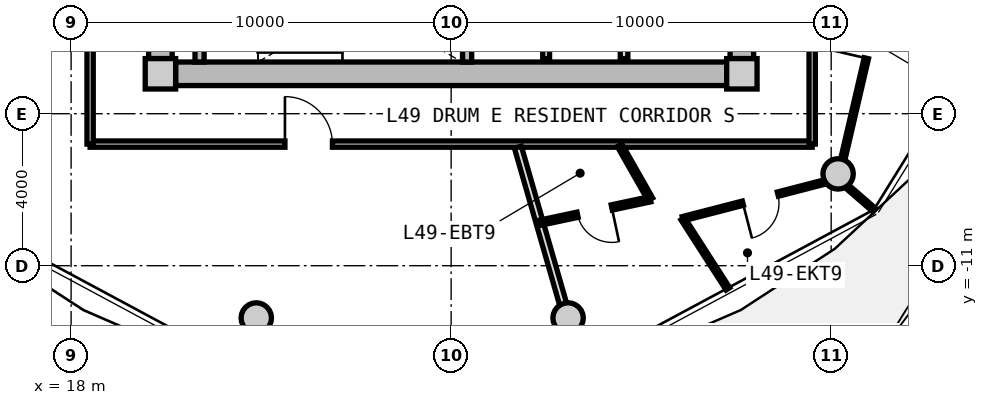
"""IFC4 building model, lengths in metres.
Left out: names, types, materials, properties, quantities, classifications, styles, units other than length and angle.
Written with IfcOpenShell. Run it as: python <this file> out.ifc"""

import sys

from ifc_helpers import new_model, si_unit, direction, frame, frame_2d, origin, origin_2d, place, context, subcontext, project, spatial, rectangle, circle, extrude, source, transform, mapped, element, fill, save


model = new_model("IFC4")
c1 = context("Model", 3, precision=1e-05, world=origin(), true_north=direction((0.0, 1.0)))
c2 = subcontext(c1, "Body", "Model", "MODEL_VIEW")
j1 = project(units=[si_unit("LENGTHUNIT", "METRE"), si_unit("PLANEANGLEUNIT", "RADIAN")], contexts=[c1])
p1 = place(None, origin())
s1 = spatial("IfcSite", under=j1, at=p1, CompositionType="ELEMENT")
p2 = place(p1, origin())
s2 = spatial("IfcBuilding", under=s1, at=p2, CompositionType="ELEMENT")
p3 = place(p2, frame((0.0, 0.0, 158.7)))
s3 = spatial("IfcBuildingStorey", under=s2, at=p3, CompositionType="ELEMENT", Elevation=158.7)
m1 = source(origin(), c2, "Body", "SweptSolid", [
    extrude(rectangle(XDim=0.8, YDim=0.8, at=origin_2d()), origin(), (0.0, 0.0, 1.0), 3.05),
])
for number, where, z_axis, x_axis in (
    (1, (20.35, -5.95, 0.0), (0.0, 0.0, 1.0), (1.0, 0.0, 0.0)),
    (2, (35.65, -5.95, 0.0), (0.0, 0.0, 1.0), (1.0, 0.0, 0.0)),
):
    element("IfcColumn", number, at=place(p3, frame(where, z_axis=z_axis, x_axis=x_axis)), inside=s3, PredefinedType="COLUMN", context=c2, shape_type="MappedRepresentation", body=[
        mapped(m1, transform((0.0, 0.0, 0.0), x_axis=(1.0, 0.0, 0.0), y_axis=(0.0, 1.0, 0.0), z_axis=(0.0, 0.0, 1.0), scale=1.0)),
    ])
m2 = source(origin(), c2, "Body", "SweptSolid", [
    extrude(rectangle(XDim=14.5, YDim=0.62, at=frame_2d((7.25, 0.0))), origin(), (0.0, 0.0, 1.0), 2.81),
])
p4 = place(p3, frame((35.25, -5.95, 0.0), z_axis=(0.0, 0.0, 1.0), x_axis=(-1.0, 0.0, 0.0)))
e3 = element("IfcWall", 3, at=p4, inside=s3, PredefinedType="SHEAR", context=c2, shape_type="MappedRepresentation", body=[
    mapped(m2, transform((0.0, 0.0, 0.0), x_axis=(1.0, 0.0, 0.0), y_axis=(0.0, 1.0, 0.0), z_axis=(0.0, 0.0, 1.0), scale=1.0)),
])
m3 = source(origin(), c2, "Body", "SweptSolid", [
    extrude(rectangle(XDim=11.1, YDim=0.62, at=frame_2d((5.55, 0.0))), origin(), (0.0, 0.0, 1.0), 2.81),
])
p5 = place(p3, frame((20.35, -5.55, 0.0), z_axis=(0.0, 0.0, 1.0), x_axis=(0.0, 1.0, 0.0)))
e4 = element("IfcWall", 4, at=p5, inside=s3, PredefinedType="SHEAR", context=c2, shape_type="MappedRepresentation", body=[
    mapped(m3, transform((0.0, 0.0, 0.0), x_axis=(1.0, 0.0, 0.0), y_axis=(0.0, 1.0, 0.0), z_axis=(0.0, 0.0, 1.0), scale=1.0)),
])
p6 = place(p5, frame((3.8, 0.0, 0.0)))
e5 = element("IfcOpeningElement", 5, at=p6, cuts=e4, PredefinedType="OPENING", context=c2, shape_type="SweptSolid", body=[
    extrude(rectangle(XDim=1.2, YDim=2.15, at=frame_2d((0.6, 1.075))), frame((0.0, 0.32, 0.0), z_axis=(0.0, -1.0, 0.0), x_axis=(1.0, 0.0, 0.0)), (0.0, 0.0, 1.0), 0.64),
])
p7 = place(p3, frame((35.65, 5.55, 0.0), z_axis=(0.0, 0.0, 1.0), x_axis=(0.0, -1.0, 0.0)))
e6 = element("IfcWall", 6, at=p7, inside=s3, PredefinedType="SHEAR", context=c2, shape_type="MappedRepresentation", body=[
    mapped(m3, transform((0.0, 0.0, 0.0), x_axis=(1.0, 0.0, 0.0), y_axis=(0.0, 1.0, 0.0), z_axis=(0.0, 0.0, 1.0), scale=1.0)),
])
p8 = place(p7, frame((5.65, 0.0, 0.0)))
e7 = element("IfcOpeningElement", 7, at=p8, cuts=e6, PredefinedType="OPENING", context=c2, shape_type="SweptSolid", body=[
    extrude(rectangle(XDim=1.2, YDim=2.15, at=frame_2d((0.6, 1.075))), frame((0.0, 0.32, 0.0), z_axis=(0.0, -1.0, 0.0), x_axis=(1.0, 0.0, 0.0)), (0.0, 0.0, 1.0), 0.64),
])
m4 = source(origin(), c2, "Body", "SweptSolid", [
    extrude(circle(Radius=0.4, at=origin_2d()), origin(), (0.0, 0.0, 1.0), 3.05),
])
for number, where, z_axis, x_axis in (
    (8, (22.873, -12.375, 0.0), (0.0, 0.0, 1.0), (1.0, 0.0, 0.0)),
    (9, (31.077, -12.375, 0.0), (0.0, 0.0, 1.0), (1.0, 0.0, 0.0)),
    (10, (38.183, -8.584, 0.0), (0.0, 0.0, 1.0), (1.0, 0.0, 0.0)),
):
    element("IfcColumn", number, at=place(p3, frame(where, z_axis=z_axis, x_axis=x_axis)), inside=s3, PredefinedType="COLUMN", context=c2, shape_type="MappedRepresentation", body=[
        mapped(m4, transform((0.0, 0.0, 0.0), x_axis=(1.0, 0.0, 0.0), y_axis=(0.0, 1.0, 0.0), z_axis=(0.0, 0.0, 1.0), scale=1.0)),
    ])
m5 = source(origin(), c2, "Body", "SweptSolid", [
    extrude(rectangle(XDim=3.19, YDim=0.24, at=frame_2d((1.595, 0.0))), origin(), (0.0, 0.0, 1.0), 2.81),
])
for number, where, z_axis, x_axis in (
    (11, (21.38, -5.64, 0.0), (0.0, 0.0, 1.0), (0.0, 1.0, 0.0)),
    (12, (28.42, -5.64, 0.0), (0.0, 0.0, 1.0), (0.0, 1.0, 0.0)),
):
    element("IfcWall", number, at=place(p3, frame(where, z_axis=z_axis, x_axis=x_axis)), inside=s3, PredefinedType="PARTITIONING", context=c2, shape_type="MappedRepresentation", body=[
        mapped(m5, transform((0.0, 0.0, 0.0), x_axis=(1.0, 0.0, 0.0), y_axis=(0.0, 1.0, 0.0), z_axis=(0.0, 0.0, 1.0), scale=1.0)),
    ])
m6 = source(origin(), c2, "Body", "SweptSolid", [
    extrude(rectangle(XDim=3.8, YDim=0.2, at=frame_2d((1.9, 0.0))), origin(), (0.0, 0.0, 1.0), 2.795),
])
p9 = place(p3, frame((32.55, -5.55, 0.0), z_axis=(0.0, 0.0, 1.0), x_axis=(0.0, 1.0, 0.0)))
e13 = element("IfcWall", 13, at=p9, inside=s3, PredefinedType="PARTITIONING", context=c2, shape_type="MappedRepresentation", body=[
    mapped(m6, transform((0.0, 0.0, 0.0), x_axis=(1.0, 0.0, 0.0), y_axis=(0.0, 1.0, 0.0), z_axis=(0.0, 0.0, 1.0), scale=1.0)),
])
m7 = source(origin(), c2, "Body", "SweptSolid", [
    extrude(rectangle(XDim=3.22, YDim=0.18, at=frame_2d((1.61, 0.0))), origin(), (0.0, 0.0, 1.0), 2.795),
])
p10 = place(p3, frame((30.5, -5.55, 0.0), z_axis=(0.0, 0.0, 1.0), x_axis=(0.0, 1.0, 0.0)))
e14 = element("IfcWall", 14, at=p10, inside=s3, PredefinedType="PARTITIONING", context=c2, shape_type="MappedRepresentation", body=[
    mapped(m7, transform((0.0, 0.0, 0.0), x_axis=(1.0, 0.0, 0.0), y_axis=(0.0, 1.0, 0.0), z_axis=(0.0, 0.0, 1.0), scale=1.0)),
])
m8 = source(origin(), c2, "Body", "SweptSolid", [
    extrude(rectangle(XDim=19.0, YDim=0.165, at=frame_2d((9.5, 0.0))), origin(), (0.0, 0.0, 1.0), 2.795),
])
p11 = place(p3, frame((37.5, -7.8, 0.0), z_axis=(0.0, 0.0, 1.0), x_axis=(-1.0, 0.0, 0.0)))
e15 = element("IfcWall", 15, at=p11, inside=s3, PredefinedType="PARTITIONING", context=c2, shape_type="MappedRepresentation", body=[
    mapped(m8, transform((0.0, 0.0, 0.0), x_axis=(1.0, 0.0, 0.0), y_axis=(0.0, 1.0, 0.0), z_axis=(0.0, 0.0, 1.0), scale=1.0)),
])
p12 = place(p11, frame((12.623, 0.0, 0.0)))
e16 = element("IfcOpeningElement", 16, at=p12, cuts=e15, PredefinedType="OPENING", context=c2, shape_type="SweptSolid", body=[
    extrude(rectangle(XDim=1.25, YDim=2.2, at=frame_2d((0.625, 1.1))), frame((0.0, 0.093, 0.0), z_axis=(0.0, -1.0, 0.0), x_axis=(1.0, 0.0, 0.0)), (0.0, 0.0, 1.0), 0.185),
])
m9 = source(origin(), c2, "Body", "SweptSolid", [
    extrude(rectangle(XDim=7.365, YDim=0.165, at=frame_2d((3.682, 0.0))), origin(), (0.0, 0.0, 1.0), 2.795),
])
p13 = place(p3, frame((18.5, -7.8, 0.0), z_axis=(0.0, 0.0, 1.0), x_axis=(0.0, 1.0, 0.0)))
e17 = element("IfcWall", 17, at=p13, inside=s3, PredefinedType="PARTITIONING", context=c2, shape_type="MappedRepresentation", body=[
    mapped(m9, transform((0.0, 0.0, 0.0), x_axis=(1.0, 0.0, 0.0), y_axis=(0.0, 1.0, 0.0), z_axis=(0.0, 0.0, 1.0), scale=1.0)),
])
m10 = source(origin(), c2, "Body", "SweptSolid", [
    extrude(rectangle(XDim=6.88, YDim=0.165, at=frame_2d((3.44, 0.0))), origin(), (0.0, 0.0, 1.0), 2.795),
])
p14 = place(p3, frame((37.5, -0.92, 0.0), z_axis=(0.0, 0.0, 1.0), x_axis=(0.0, -1.0, 0.0)))
e18 = element("IfcWall", 18, at=p14, inside=s3, PredefinedType="PARTITIONING", context=c2, shape_type="MappedRepresentation", body=[
    mapped(m10, transform((0.0, 0.0, 0.0), x_axis=(1.0, 0.0, 0.0), y_axis=(0.0, 1.0, 0.0), z_axis=(0.0, 0.0, 1.0), scale=1.0)),
])
p15 = place(p14, frame((2.915, 0.0, 0.0)))
e19 = element("IfcOpeningElement", 19, at=p15, cuts=e18, PredefinedType="OPENING", context=c2, shape_type="SweptSolid", body=[
    extrude(rectangle(XDim=1.05, YDim=2.15, at=frame_2d((0.525, 1.075))), frame((0.0, 0.093, 0.0), z_axis=(0.0, -1.0, 0.0), x_axis=(1.0, 0.0, 0.0)), (0.0, 0.0, 1.0), 0.185),
])
m11 = source(origin(), c2, "Body", "SweptSolid", [
    extrude(rectangle(XDim=6.035, YDim=0.19, at=frame_2d((3.018, 0.0))), origin(), (0.0, 0.0, 1.0), 2.345),
])
p16 = place(p3, frame((29.756, -7.88, 0.0), z_axis=(0.0, 0.0, 1.0), x_axis=(0.276809454862, -0.960924828329, 0.0)))
e20 = element("IfcWall", 20, at=p16, inside=s3, PredefinedType="PARTITIONING", context=c2, shape_type="MappedRepresentation", body=[
    mapped(m11, transform((0.0, 0.0, 0.0), x_axis=(1.0, 0.0, 0.0), y_axis=(0.0, 1.0, 0.0), z_axis=(0.0, 0.0, 1.0), scale=1.0)),
])
m12 = source(origin(), c2, "Body", "SweptSolid", [
    extrude(rectangle(XDim=7.469, YDim=0.115, at=frame_2d((3.734, 0.0))), origin(), (0.0, 0.0, 1.0), 2.795),
])
p17 = place(p3, frame((38.187, -8.715, 0.0), z_axis=(0.0, 0.0, 1.0), x_axis=(0.226790420763, 0.973943584121, 0.0)))
e21 = element("IfcWall", 21, at=p17, inside=s3, PredefinedType="PARTITIONING", context=c2, shape_type="MappedRepresentation", body=[
    mapped(m12, transform((0.0, 0.0, 0.0), x_axis=(1.0, 0.0, 0.0), y_axis=(0.0, 1.0, 0.0), z_axis=(0.0, 0.0, 1.0), scale=1.0)),
])
p18 = place(p17, frame((3.259, 0.0, 0.0)))
e22 = element("IfcOpeningElement", 22, at=p18, cuts=e21, PredefinedType="OPENING", context=c2, shape_type="SweptSolid", body=[
    extrude(rectangle(XDim=0.95, YDim=2.1, at=frame_2d((0.475, 1.05))), frame((0.0, 0.067, 0.0), z_axis=(0.0, -1.0, 0.0), x_axis=(1.0, 0.0, 0.0)), (0.0, 0.0, 1.0), 0.135),
])
m13 = source(origin(), c2, "Body", "SweptSolid", [
    extrude(rectangle(XDim=1.258, YDim=0.115, at=frame_2d((0.629, 0.0))), origin(), (0.0, 0.0, 1.0), 2.795),
])
p19 = place(p3, frame((38.187, -8.715, 0.0), z_axis=(0.0, 0.0, 1.0), x_axis=(0.755765923317, -0.654841865761, 0.0)))
e23 = element("IfcWall", 23, at=p19, inside=s3, PredefinedType="PARTITIONING", context=c2, shape_type="MappedRepresentation", body=[
    mapped(m13, transform((0.0, 0.0, 0.0), x_axis=(1.0, 0.0, 0.0), y_axis=(0.0, 1.0, 0.0), z_axis=(0.0, 0.0, 1.0), scale=1.0)),
])
m14 = source(origin(), c2, "Body", "SweptSolid", [
    extrude(rectangle(XDim=1.635, YDim=0.14, at=frame_2d((0.817, 0.0))), origin(), (0.0, 0.0, 1.0), 2.795),
])
p20 = place(p3, frame((32.434, -7.83, 0.0), z_axis=(0.0, 0.0, 1.0), x_axis=(0.494078690764, -0.869417188312, 0.0)))
e24 = element("IfcWall", 24, at=p20, inside=s3, PredefinedType="PARTITIONING", context=c2, shape_type="MappedRepresentation", body=[
    mapped(m14, transform((0.0, 0.0, 0.0), x_axis=(1.0, 0.0, 0.0), y_axis=(0.0, 1.0, 0.0), z_axis=(0.0, 0.0, 1.0), scale=1.0)),
])
m15 = source(origin(), c2, "Body", "SweptSolid", [
    extrude(rectangle(XDim=2.995, YDim=0.14, at=frame_2d((1.498, 0.0))), origin(), (0.0, 0.0, 1.0), 2.435),
])
p21 = place(p3, frame((33.241, -9.251, 0.0), z_axis=(0.0, 0.0, 1.0), x_axis=(-0.978075914325, -0.208248663425, 0.0)))
e25 = element("IfcWall", 25, at=p21, inside=s3, PredefinedType="PARTITIONING", context=c2, shape_type="MappedRepresentation", body=[
    mapped(m15, transform((0.0, 0.0, 0.0), x_axis=(1.0, 0.0, 0.0), y_axis=(0.0, 1.0, 0.0), z_axis=(0.0, 0.0, 1.0), scale=1.0)),
])
p22 = place(p21, frame((1.038, 0.0, 0.0)))
e26 = element("IfcOpeningElement", 26, at=p22, cuts=e25, PredefinedType="OPENING", context=c2, shape_type="SweptSolid", body=[
    extrude(rectangle(XDim=0.92, YDim=2.1, at=frame_2d((0.46, 1.05))), frame((0.0, 0.08, 0.0), z_axis=(0.0, -1.0, 0.0), x_axis=(1.0, 0.0, 0.0)), (0.0, 0.0, 1.0), 0.16),
])
m16 = source(origin(), c2, "Body", "SweptSolid", [
    extrude(rectangle(XDim=2.194, YDim=0.115, at=frame_2d((1.097, 0.0))), origin(), (0.0, 0.0, 1.0), 2.795),
])
p23 = place(p3, frame((34.095, -9.764, 0.0), z_axis=(0.0, 0.0, 1.0), x_axis=(0.540858831194, -0.841113383985, 0.0)))
e27 = element("IfcWall", 27, at=p23, inside=s3, PredefinedType="PARTITIONING", context=c2, shape_type="MappedRepresentation", body=[
    mapped(m16, transform((0.0, 0.0, 0.0), x_axis=(1.0, 0.0, 0.0), y_axis=(0.0, 1.0, 0.0), z_axis=(0.0, 0.0, 1.0), scale=1.0)),
])
m17 = source(origin(), c2, "Body", "SweptSolid", [
    extrude(rectangle(XDim=4.218, YDim=0.115, at=frame_2d((2.109, 0.0))), origin(), (0.0, 0.0, 1.0), 2.345),
])
p24 = place(p3, frame((34.095, -9.764, 0.0), z_axis=(0.0, 0.0, 1.0), x_axis=(0.968124892577, 0.250467946797, 0.0)))
e28 = element("IfcWall", 28, at=p24, inside=s3, PredefinedType="PARTITIONING", context=c2, shape_type="MappedRepresentation", body=[
    mapped(m17, transform((0.0, 0.0, 0.0), x_axis=(1.0, 0.0, 0.0), y_axis=(0.0, 1.0, 0.0), z_axis=(0.0, 0.0, 1.0), scale=1.0)),
])
p25 = place(p24, frame((1.634, 0.0, 0.0)))
e29 = element("IfcOpeningElement", 29, at=p25, cuts=e28, PredefinedType="OPENING", context=c2, shape_type="SweptSolid", body=[
    extrude(rectangle(XDim=0.95, YDim=2.1, at=frame_2d((0.475, 1.05))), frame((0.0, 0.067, 0.0), z_axis=(0.0, -1.0, 0.0), x_axis=(1.0, 0.0, 0.0)), (0.0, 0.0, 1.0), 0.135),
])
m18 = source(origin(), c2, "Body", "SweptSolid", [
    extrude(rectangle(XDim=1.25, YDim=2.2, at=frame_2d((0.625, 1.1))), frame((0.0, 0.025, 0.0), z_axis=(0.0, -1.0, 0.0), x_axis=(1.0, 0.0, 0.0)), (0.0, 0.0, 1.0), 0.05),
])
p26 = place(p12, frame((1.25, 0.0, 0.0), z_axis=(0.0, 0.0, 1.0), x_axis=(-1.0, 0.0, 0.0)))
e30 = element("IfcDoor", 30, at=p26, inside=s3, OperationType="SINGLE_SWING_LEFT", PredefinedType="DOOR", context=c2, shape_type="MappedRepresentation", body=[
    mapped(m18, transform((0.0, 0.0, 0.0), x_axis=(1.0, 0.0, 0.0), y_axis=(0.0, 1.0, 0.0), z_axis=(0.0, 0.0, 1.0), scale=1.0)),
])
fill(e16, e30)
m19 = source(origin(), c2, "Body", "SweptSolid", [
    extrude(rectangle(XDim=0.92, YDim=2.1, at=frame_2d((0.46, 1.05))), frame((0.0, 0.025, 0.0), z_axis=(0.0, -1.0, 0.0), x_axis=(1.0, 0.0, 0.0)), (0.0, 0.0, 1.0), 0.05),
])
p27 = place(p22, origin())
e31 = element("IfcDoor", 31, at=p27, inside=s3, OperationType="SINGLE_SWING_LEFT", PredefinedType="DOOR", context=c2, shape_type="MappedRepresentation", body=[
    mapped(m19, transform((0.0, 0.0, 0.0), x_axis=(1.0, 0.0, 0.0), y_axis=(0.0, 1.0, 0.0), z_axis=(0.0, 0.0, 1.0), scale=1.0)),
])
fill(e26, e31)
m20 = source(origin(), c2, "Body", "SweptSolid", [
    extrude(rectangle(XDim=0.95, YDim=2.1, at=frame_2d((0.475, 1.05))), frame((0.0, 0.025, 0.0), z_axis=(0.0, -1.0, 0.0), x_axis=(1.0, 0.0, 0.0)), (0.0, 0.0, 1.0), 0.05),
])
p28 = place(p25, frame((0.95, 0.0, 0.0), z_axis=(0.0, 0.0, 1.0), x_axis=(-1.0, 0.0, 0.0)))
e32 = element("IfcDoor", 32, at=p28, inside=s3, OperationType="SINGLE_SWING_RIGHT", PredefinedType="DOOR", context=c2, shape_type="MappedRepresentation", body=[
    mapped(m20, transform((0.0, 0.0, 0.0), x_axis=(1.0, 0.0, 0.0), y_axis=(0.0, 1.0, 0.0), z_axis=(0.0, 0.0, 1.0), scale=1.0)),
])
fill(e29, e32)
p29 = place(p18, origin())
e33 = element("IfcDoor", 33, at=p29, inside=s3, OperationType="SINGLE_SWING_LEFT", PredefinedType="DOOR", context=c2, shape_type="MappedRepresentation", body=[
    mapped(m20, transform((0.0, 0.0, 0.0), x_axis=(1.0, 0.0, 0.0), y_axis=(0.0, 1.0, 0.0), z_axis=(0.0, 0.0, 1.0), scale=1.0)),
])
fill(e22, e33)
save(model, sys.argv[1])
